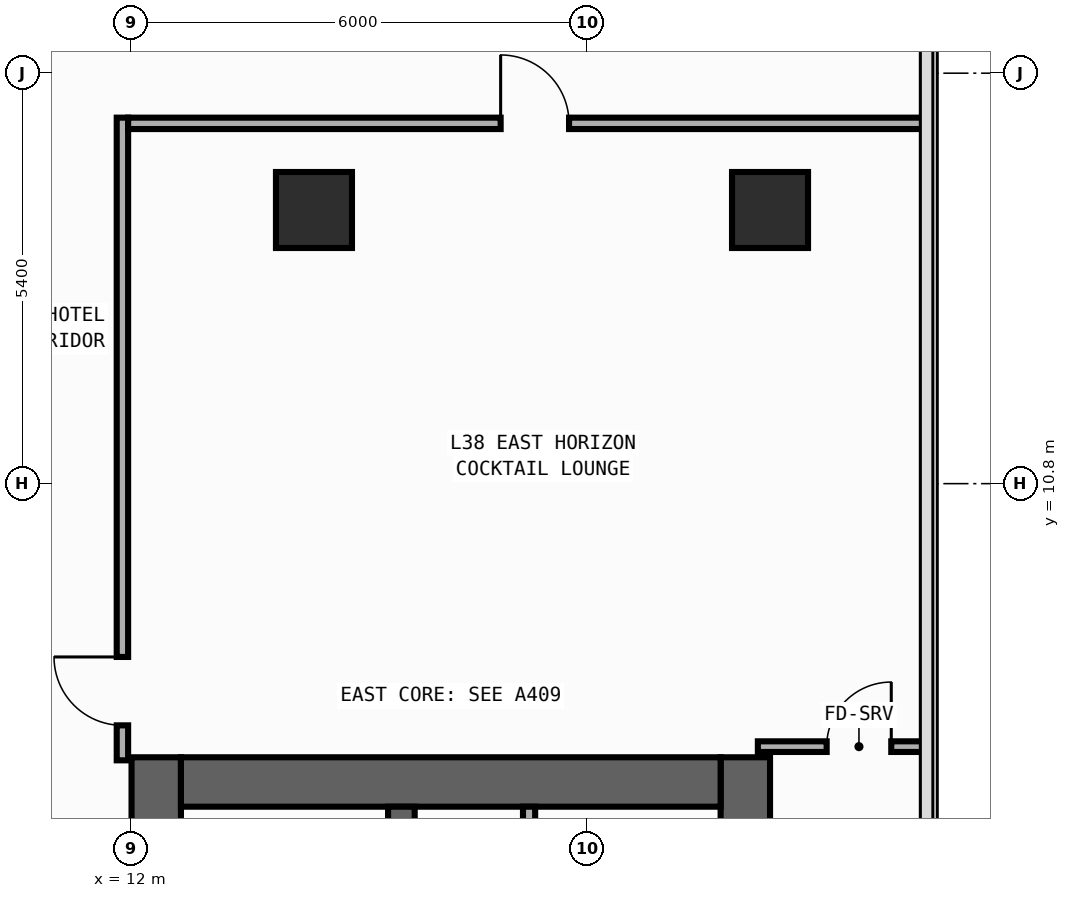
"""IFC4 building model, lengths in metres.
Left out: names, types, materials, properties, quantities, classifications, styles, units other than length and angle.
Written with IfcOpenShell. Run it as: python <this file> out.ifc"""

import sys

from ifc_helpers import new_model, si_unit, direction, frame, frame_2d, origin, origin_2d, place, context, subcontext, project, spatial, rectangle, extrude, element, fill, save


model = new_model("IFC4")
c1 = context("Model", 3, precision=1e-05, world=origin(), true_north=direction((0.0, 1.0)))
c2 = subcontext(c1, "Body", "Model", "MODEL_VIEW")
j1 = project(units=[si_unit("LENGTHUNIT", "METRE"), si_unit("PLANEANGLEUNIT", "RADIAN")], contexts=[c1])
p1 = place(None, origin())
s1 = spatial("IfcSite", under=j1, at=p1, CompositionType="ELEMENT")
p2 = place(p1, origin())
s2 = spatial("IfcBuilding", under=s1, at=p2, CompositionType="ELEMENT")
p3 = place(p2, frame((0.0, 0.0, 168.8)))
s3 = spatial("IfcBuildingStorey", under=s2, at=p3, CompositionType="ELEMENT", Elevation=168.8)
p4 = place(p3, frame((12.325, -19.8, 0.0), z_axis=(0.0, 0.0, 1.0), x_axis=(0.0, 1.0, 0.0)))
e1 = element("IfcWall", 1, at=p4, inside=s3, PredefinedType="SHEAR", context=c2, shape_type="SweptSolid", body=[
    extrude(rectangle(XDim=27.0, YDim=0.65, at=frame_2d((13.5, 0.0))), origin(), (0.0, 0.0, 1.0), 3.54),
])
p5 = place(p4, frame((23.05, 0.0, 0.0)))
e2 = element("IfcOpeningElement", 2, at=p5, cuts=e1, PredefinedType="OPENING", context=c2, shape_type="SweptSolid", body=[
    extrude(rectangle(XDim=1.1, YDim=2.2, at=frame_2d((0.55, 1.1))), frame((0.0, 0.335, 0.0), z_axis=(0.0, -1.0, 0.0), x_axis=(1.0, 0.0, 0.0)), (0.0, 0.0, 1.0), 0.67),
])
p6 = place(p4, frame((19.85, 0.0, 0.0)))
e3 = element("IfcOpeningElement", 3, at=p6, cuts=e1, PredefinedType="OPENING", context=c2, shape_type="SweptSolid", body=[
    extrude(rectangle(XDim=1.1, YDim=2.2, at=frame_2d((0.55, 1.1))), frame((0.0, 0.335, 0.0), z_axis=(0.0, -1.0, 0.0), x_axis=(1.0, 0.0, 0.0)), (0.0, 0.0, 1.0), 0.67),
])
p7 = place(p4, frame((16.65, 0.0, 0.0)))
e4 = element("IfcOpeningElement", 4, at=p7, cuts=e1, PredefinedType="OPENING", context=c2, shape_type="SweptSolid", body=[
    extrude(rectangle(XDim=1.1, YDim=2.2, at=frame_2d((0.55, 1.1))), frame((0.0, 0.335, 0.0), z_axis=(0.0, -1.0, 0.0), x_axis=(1.0, 0.0, 0.0)), (0.0, 0.0, 1.0), 0.67),
])
p8 = place(p4, frame((6.275, 0.0, 0.0)))
e5 = element("IfcOpeningElement", 5, at=p8, cuts=e1, PredefinedType="OPENING", context=c2, shape_type="SweptSolid", body=[
    extrude(rectangle(XDim=0.85, YDim=2.1, at=frame_2d((0.425, 1.05))), frame((0.0, 0.335, 0.0), z_axis=(0.0, -1.0, 0.0), x_axis=(1.0, 0.0, 0.0)), (0.0, 0.0, 1.0), 0.67),
])
p9 = place(p4, frame((8.575, 0.0, 0.0)))
e6 = element("IfcOpeningElement", 6, at=p9, cuts=e1, PredefinedType="OPENING", context=c2, shape_type="SweptSolid", body=[
    extrude(rectangle(XDim=0.85, YDim=2.1, at=frame_2d((0.425, 1.05))), frame((0.0, 0.335, 0.0), z_axis=(0.0, -1.0, 0.0), x_axis=(1.0, 0.0, 0.0)), (0.0, 0.0, 1.0), 0.67),
])
p10 = place(p4, frame((10.675, 0.0, 0.0)))
e7 = element("IfcOpeningElement", 7, at=p10, cuts=e1, PredefinedType="OPENING", context=c2, shape_type="SweptSolid", body=[
    extrude(rectangle(XDim=0.85, YDim=2.1, at=frame_2d((0.425, 1.05))), frame((0.0, 0.335, 0.0), z_axis=(0.0, -1.0, 0.0), x_axis=(1.0, 0.0, 0.0)), (0.0, 0.0, 1.0), 0.67),
])
p11 = place(p4, frame((12.725, 0.0, 0.0)))
e8 = element("IfcOpeningElement", 8, at=p11, cuts=e1, PredefinedType="OPENING", context=c2, shape_type="SweptSolid", body=[
    extrude(rectangle(XDim=1.15, YDim=2.2, at=frame_2d((0.575, 1.1))), frame((0.0, 0.335, 0.0), z_axis=(0.0, -1.0, 0.0), x_axis=(1.0, 0.0, 0.0)), (0.0, 0.0, 1.0), 0.67),
])
p12 = place(p4, frame((25.125, 0.0, 0.0)))
e9 = element("IfcOpeningElement", 9, at=p12, cuts=e1, PredefinedType="OPENING", context=c2, shape_type="SweptSolid", body=[
    extrude(rectangle(XDim=0.85, YDim=2.1, at=frame_2d((0.425, 1.05))), frame((0.0, 0.335, 0.0), z_axis=(0.0, -1.0, 0.0), x_axis=(1.0, 0.0, 0.0)), (0.0, 0.0, 1.0), 0.67),
])
p13 = place(p3, frame((20.075, -19.8, 0.0), z_axis=(0.0, 0.0, 1.0), x_axis=(0.0, 1.0, 0.0)))
e10 = element("IfcWall", 10, at=p13, inside=s3, PredefinedType="SHEAR", context=c2, shape_type="SweptSolid", body=[
    extrude(rectangle(XDim=27.0, YDim=0.65, at=frame_2d((13.5, 0.0))), origin(), (0.0, 0.0, 1.0), 3.54),
])
p14 = place(p3, frame((12.65, 6.875, 0.0), z_axis=(0.0, 0.0, 1.0), x_axis=(1.0, 0.0, 0.0)))
e11 = element("IfcWall", 11, at=p14, inside=s3, PredefinedType="SHEAR", context=c2, shape_type="SweptSolid", body=[
    extrude(rectangle(XDim=7.1, YDim=0.65, at=frame_2d((3.55, 0.0))), origin(), (0.0, 0.0, 1.0), 3.54),
])
p15 = place(p3, frame((15.55, -19.15, 0.0), z_axis=(0.0, 0.0, 1.0), x_axis=(0.0, 1.0, 0.0)))
e12 = element("IfcWall", 12, at=p15, inside=s3, PredefinedType="SHEAR", context=c2, shape_type="SweptSolid", body=[
    extrude(rectangle(XDim=25.7, YDim=0.35, at=frame_2d((12.85, 0.0))), origin(), (0.0, 0.0, 1.0), 3.54),
])
p16 = place(p15, frame((12.075, 0.0, 0.0)))
e13 = element("IfcOpeningElement", 13, at=p16, cuts=e12, PredefinedType="OPENING", context=c2, shape_type="SweptSolid", body=[
    extrude(rectangle(XDim=1.15, YDim=2.2, at=frame_2d((0.575, 1.1))), frame((0.0, 0.185, 0.0), z_axis=(0.0, -1.0, 0.0), x_axis=(1.0, 0.0, 0.0)), (0.0, 0.0, 1.0), 0.37),
])
p17 = place(p15, frame((24.475, 0.0, 0.0)))
e14 = element("IfcOpeningElement", 14, at=p17, cuts=e12, PredefinedType="OPENING", context=c2, shape_type="SweptSolid", body=[
    extrude(rectangle(XDim=0.85, YDim=2.1, at=frame_2d((0.425, 1.05))), frame((0.0, 0.185, 0.0), z_axis=(0.0, -1.0, 0.0), x_axis=(1.0, 0.0, 0.0)), (0.0, 0.0, 1.0), 0.37),
])
for number, where, z_axis, x_axis in (
    (15, (20.4, 14.4, 0.0), (0.0, 0.0, 1.0), (1.0, 0.0, 0.0)),
    (16, (14.4, 14.4, 0.0), (0.0, 0.0, 1.0), (1.0, 0.0, 0.0)),
):
    element("IfcColumn", number, at=place(p3, frame(where, z_axis=z_axis, x_axis=x_axis)), inside=s3, PredefinedType="COLUMN", context=c2, shape_type="SweptSolid", body=[
        extrude(rectangle(XDim=1.0, YDim=1.0, at=origin_2d()), origin(), (0.0, 0.0, 1.0), 3.8),
    ])
p18 = place(p3, frame((17.23, 4.17, 0.0), z_axis=(0.0, 0.0, 1.0), x_axis=(0.0, 1.0, 0.0)))
e17 = element("IfcWall", 17, at=p18, inside=s3, PredefinedType="PARTITIONING", context=c2, shape_type="SweptSolid", body=[
    extrude(rectangle(XDim=2.38, YDim=0.16, at=frame_2d((1.19, 0.0))), origin(), (0.0, 0.0, 1.0), 3.54),
])
p19 = place(p18, frame((0.46, 0.0, 0.0)))
e18 = element("IfcOpeningElement", 18, at=p19, cuts=e17, PredefinedType="OPENING", context=c2, shape_type="SweptSolid", body=[
    extrude(rectangle(XDim=0.85, YDim=2.1, at=frame_2d((0.425, 1.05))), frame((0.0, 0.09, 0.0), z_axis=(0.0, -1.0, 0.0), x_axis=(1.0, 0.0, 0.0)), (0.0, 0.0, 1.0), 0.18),
])
p20 = place(p3, frame((11.88, 7.16, 0.0), z_axis=(0.0, 0.0, 1.0), x_axis=(0.0, 1.0, 0.0)))
e19 = element("IfcWall", 19, at=p20, inside=s3, PredefinedType="PARTITIONING", context=c2, shape_type="SweptSolid", body=[
    extrude(rectangle(XDim=8.455, YDim=0.15, at=frame_2d((4.228, 0.0))), origin(), (0.0, 0.0, 1.0), 3.54),
])
p21 = place(p20, frame((0.46, 0.0, 0.0)))
e20 = element("IfcOpeningElement", 20, at=p21, cuts=e19, PredefinedType="OPENING", context=c2, shape_type="SweptSolid", body=[
    extrude(rectangle(XDim=0.9, YDim=2.15, at=frame_2d((0.45, 1.075))), frame((0.0, 0.085, 0.0), z_axis=(0.0, -1.0, 0.0), x_axis=(1.0, 0.0, 0.0)), (0.0, 0.0, 1.0), 0.17),
])
p22 = place(p3, frame((11.955, 15.54, 0.0), z_axis=(0.0, 0.0, 1.0), x_axis=(1.0, 0.0, 0.0)))
e21 = element("IfcWall", 21, at=p22, inside=s3, PredefinedType="PARTITIONING", context=c2, shape_type="SweptSolid", body=[
    extrude(rectangle(XDim=10.5, YDim=0.15, at=frame_2d((5.25, 0.0))), origin(), (0.0, 0.0, 1.0), 3.54),
])
p23 = place(p22, frame((4.901, 0.0, 0.0)))
e22 = element("IfcOpeningElement", 22, at=p23, cuts=e21, PredefinedType="OPENING", context=c2, shape_type="SweptSolid", body=[
    extrude(rectangle(XDim=0.9, YDim=2.15, at=frame_2d((0.45, 1.075))), frame((0.0, 0.085, 0.0), z_axis=(0.0, -1.0, 0.0), x_axis=(1.0, 0.0, 0.0)), (0.0, 0.0, 1.0), 0.17),
])
p24 = place(p3, frame((20.24, 7.34, 0.0), z_axis=(0.0, 0.0, 1.0), x_axis=(1.0, 0.0, 0.0)))
e23 = element("IfcWall", 23, at=p24, inside=s3, PredefinedType="PARTITIONING", context=c2, shape_type="SweptSolid", body=[
    extrude(rectangle(XDim=2.215, YDim=0.14, at=frame_2d((1.107, 0.0))), origin(), (0.0, 0.0, 1.0), 3.54),
])
p25 = place(p24, frame((0.905, 0.0, 0.0)))
e24 = element("IfcOpeningElement", 24, at=p25, cuts=e23, PredefinedType="OPENING", context=c2, shape_type="SweptSolid", body=[
    extrude(rectangle(XDim=0.85, YDim=2.1, at=frame_2d((0.425, 1.05))), frame((0.0, 0.08, 0.0), z_axis=(0.0, -1.0, 0.0), x_axis=(1.0, 0.0, 0.0)), (0.0, 0.0, 1.0), 0.16),
])
p26 = place(p21, origin())
e25 = element("IfcDoor", 25, at=p26, inside=s3, OperationType="SINGLE_SWING_RIGHT", PredefinedType="DOOR", context=c2, shape_type="SweptSolid", body=[
    extrude(rectangle(XDim=0.9, YDim=2.15, at=frame_2d((0.45, 1.075))), frame((0.0, 0.025, 0.0), z_axis=(0.0, -1.0, 0.0), x_axis=(1.0, 0.0, 0.0)), (0.0, 0.0, 1.0), 0.05),
])
fill(e20, e25)
p27 = place(p23, origin())
e26 = element("IfcDoor", 26, at=p27, inside=s3, OperationType="SINGLE_SWING_LEFT", PredefinedType="DOOR", context=c2, shape_type="SweptSolid", body=[
    extrude(rectangle(XDim=0.9, YDim=2.15, at=frame_2d((0.45, 1.075))), frame((0.0, 0.025, 0.0), z_axis=(0.0, -1.0, 0.0), x_axis=(1.0, 0.0, 0.0)), (0.0, 0.0, 1.0), 0.05),
])
fill(e22, e26)
p28 = place(p25, origin())
e27 = element("IfcDoor", 27, at=p28, inside=s3, OperationType="SINGLE_SWING_RIGHT", PredefinedType="DOOR", context=c2, shape_type="SweptSolid", body=[
    extrude(rectangle(XDim=0.85, YDim=2.1, at=frame_2d((0.425, 1.05))), frame((0.0, 0.025, 0.0), z_axis=(0.0, -1.0, 0.0), x_axis=(1.0, 0.0, 0.0)), (0.0, 0.0, 1.0), 0.05),
])
fill(e24, e27)
save(model, sys.argv[1])
